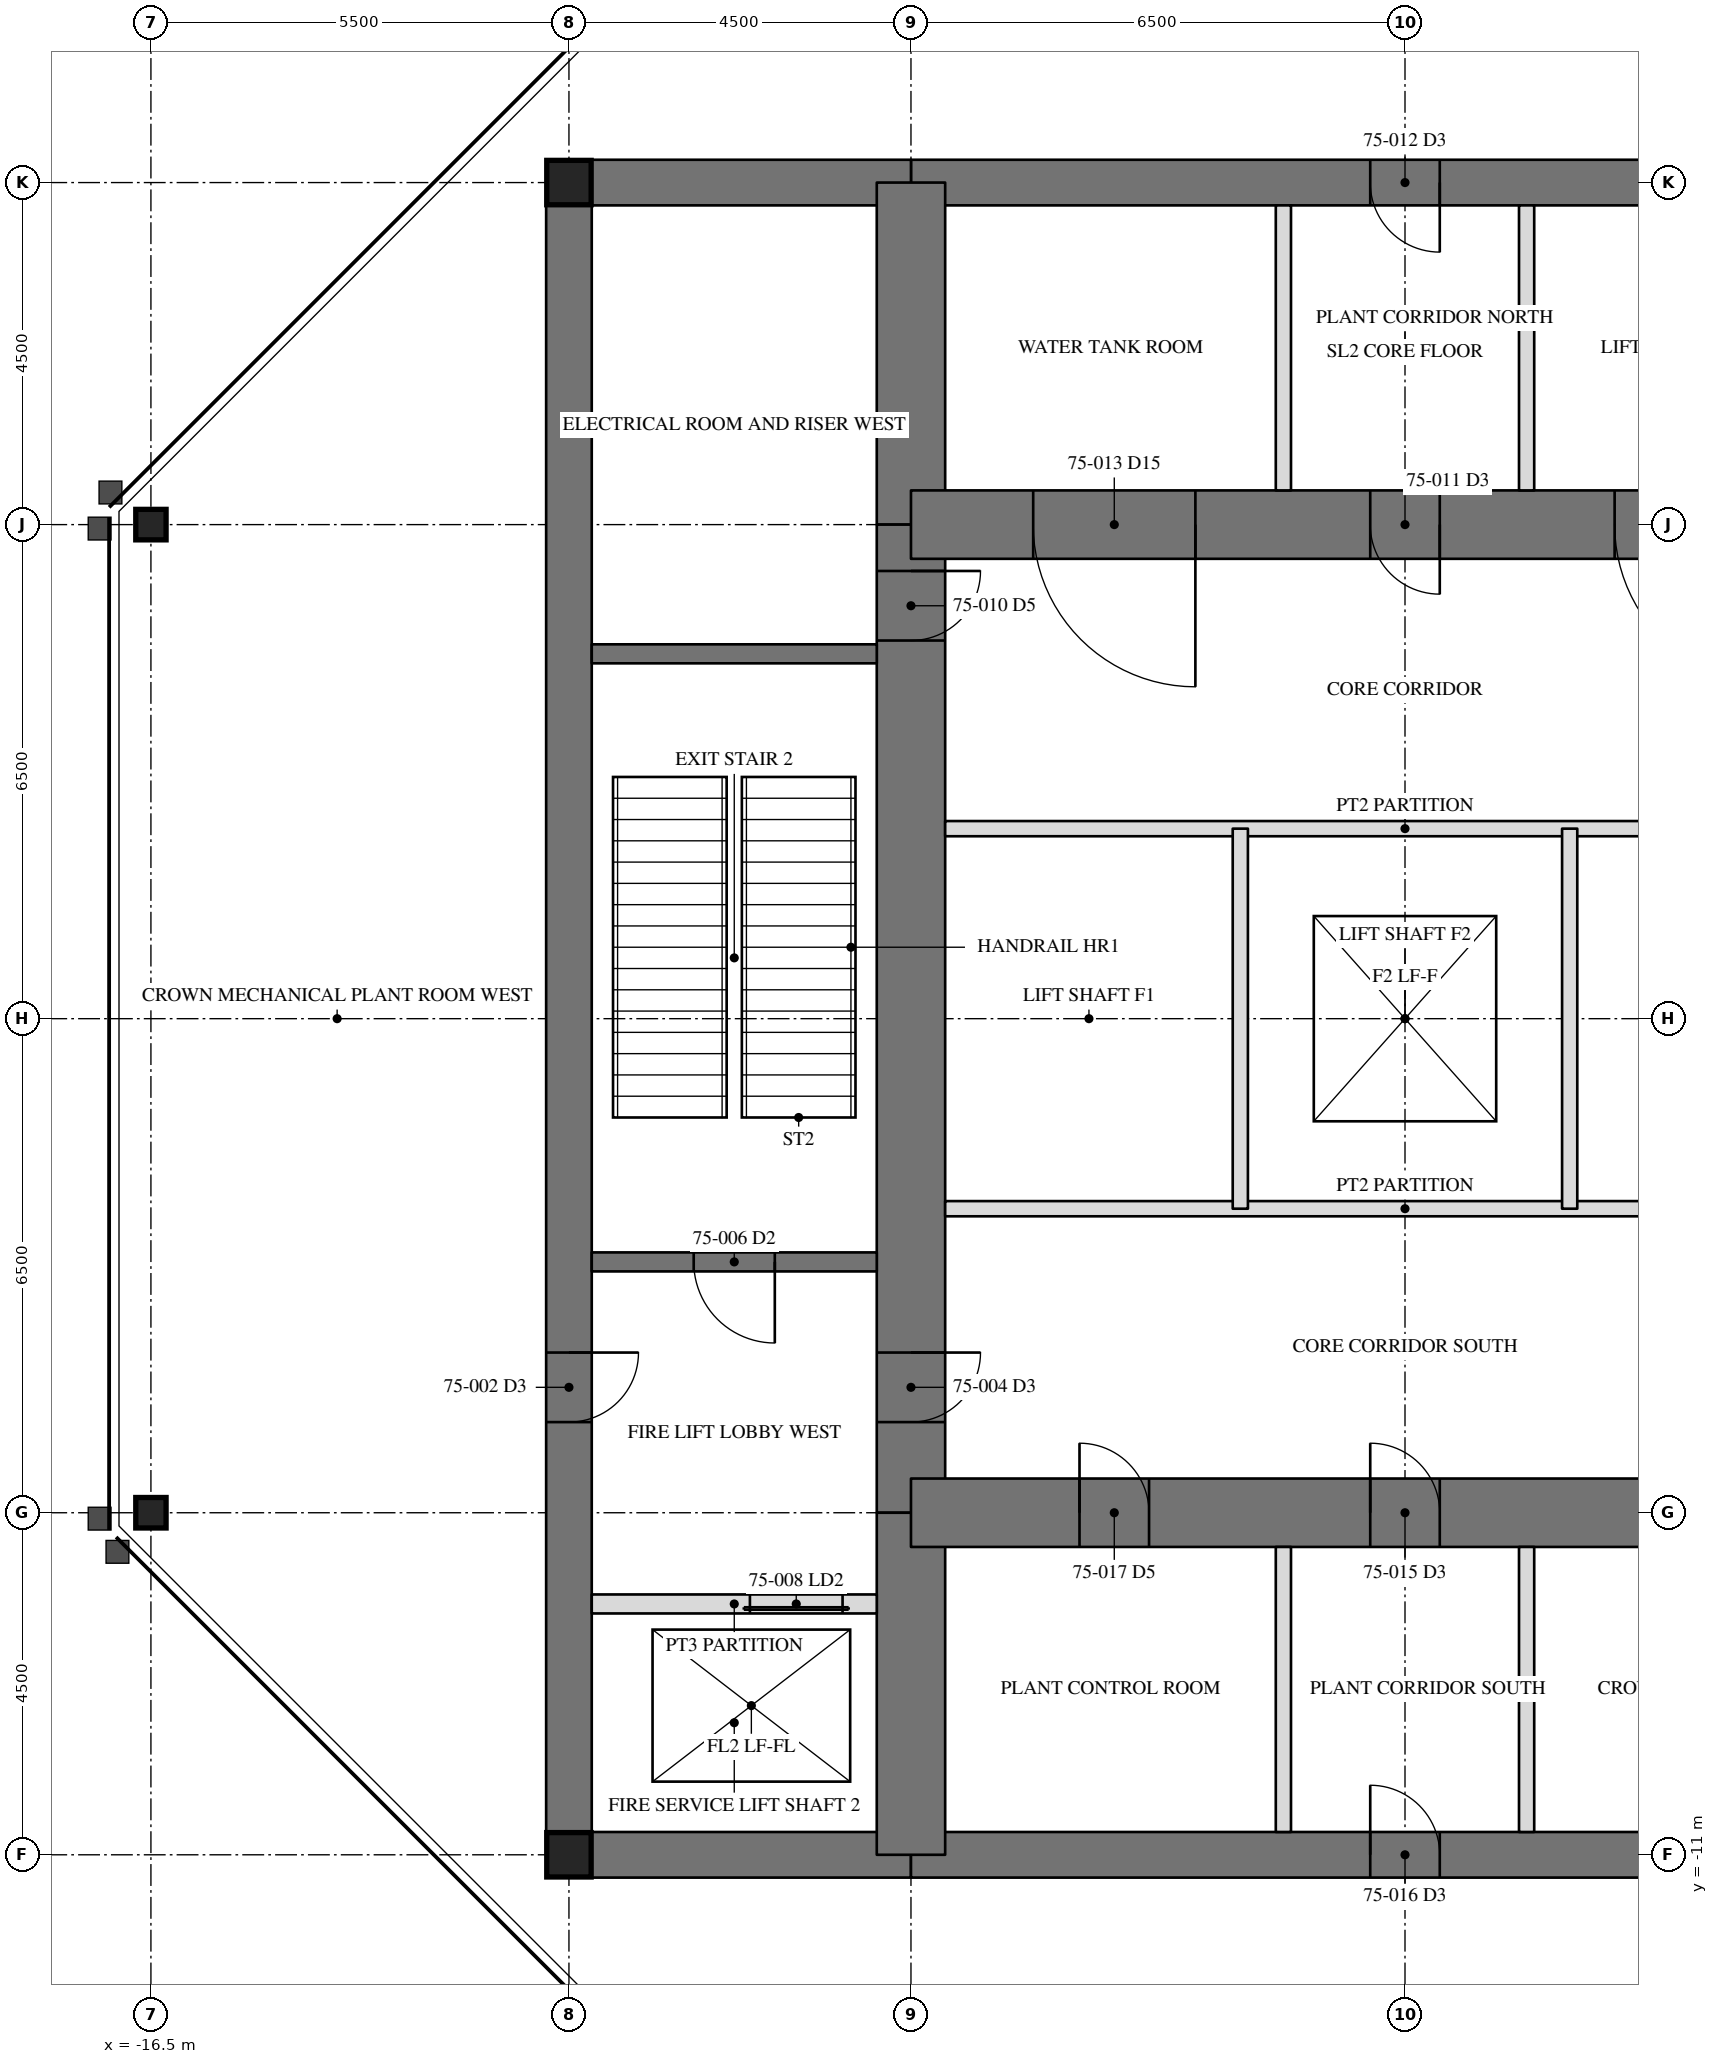
"""IFC4 building model, lengths in metres.
Left out: names, types, materials, properties, quantities, classifications, styles, units other than length and angle.
Written with IfcOpenShell. Run it as: python <this file> out.ifc"""

import sys

from ifc_helpers import new_model, si_unit, direction, frame, frame_2d, origin, origin_2d, place, context, subcontext, project, spatial, rectangle, hollow_rectangle, i_section, extrude, element, fill, save


model = new_model("IFC4")
c1 = context("Model", 3, precision=1e-05, world=origin(), true_north=direction((0.0, 1.0)))
c2 = subcontext(c1, "Body", "Model", "MODEL_VIEW")
j1 = project(units=[si_unit("LENGTHUNIT", "METRE"), si_unit("PLANEANGLEUNIT", "RADIAN")], contexts=[c1])
p1 = place(None, origin())
s1 = spatial("IfcSite", under=j1, at=p1, CompositionType="ELEMENT")
p2 = place(p1, origin())
s2 = spatial("IfcBuilding", under=s1, at=p2, CompositionType="ELEMENT")
p3 = place(p2, frame((0.0, 0.0, 304.2)))
s3 = spatial("IfcBuildingStorey", under=s2, at=p3, CompositionType="ELEMENT", Elevation=304.2)
for number, where, z_axis, x_axis in (
    (1, (-16.5, -6.5, 0.0), (0.0, 0.0, 1.0), (0.0, 1.0, 0.0)),
    (2, (-16.5, 6.5, 0.0), (0.0, 0.0, 1.0), (0.0, 1.0, 0.0)),
):
    element("IfcColumn", number, at=place(p3, frame(where, z_axis=z_axis, x_axis=x_axis)), inside=s3, PredefinedType="COLUMN", context=c2, shape_type="SweptSolid", body=[
        extrude(i_section(OverallWidth=0.401, OverallDepth=0.399, WebThickness=0.025, FlangeThickness=0.04, at=origin_2d()), origin(), (0.0, 0.0, 1.0), 6.0),
    ])
p4 = place(p3, frame((-11.0, 11.0, 0.0), z_axis=(0.0, 0.0, 1.0), x_axis=(0.0, -1.0, 0.0)))
e3 = element("IfcWall", 3, at=p4, inside=s3, PredefinedType="SHEAR", context=c2, shape_type="SweptSolid", body=[
    extrude(rectangle(XDim=22.0, YDim=0.6, at=frame_2d((11.0, 0.0))), origin(), (0.0, 0.0, 1.0), 6.0),
])
p5 = place(p4, frame((15.393, 0.0, 0.0)))
e4 = element("IfcOpeningElement", 4, at=p5, cuts=e3, PredefinedType="OPENING", context=c2, shape_type="SweptSolid", body=[
    extrude(rectangle(XDim=0.915, YDim=2.134, at=frame_2d((0.458, 1.067))), frame((0.0, 0.31, 0.0), z_axis=(0.0, -1.0, 0.0), x_axis=(1.0, 0.0, 0.0)), (0.0, 0.0, 1.0), 0.62),
])
p6 = place(p3, frame((6.5, 11.0, 0.0), z_axis=(0.0, 0.0, 1.0), x_axis=(-1.0, 0.0, 0.0)))
e5 = element("IfcWall", 5, at=p6, inside=s3, PredefinedType="SHEAR", context=c2, shape_type="SweptSolid", body=[
    extrude(rectangle(XDim=13.0, YDim=0.6, at=frame_2d((6.5, 0.0))), origin(), (0.0, 0.0, 1.0), 6.0),
])
p7 = place(p6, frame((6.042, 0.0, 0.0)))
e6 = element("IfcOpeningElement", 6, at=p7, cuts=e5, PredefinedType="OPENING", context=c2, shape_type="SweptSolid", body=[
    extrude(rectangle(XDim=0.915, YDim=2.134, at=frame_2d((0.458, 1.067))), frame((0.0, 0.31, 0.0), z_axis=(0.0, -1.0, 0.0), x_axis=(1.0, 0.0, 0.0)), (0.0, 0.0, 1.0), 0.62),
])
for number, where, z_axis, x_axis in (
    (7, (-6.5, 11.0, 0.0), (0.0, 0.0, 1.0), (-1.0, 0.0, 0.0)),
    (8, (-11.0, -11.0, 0.0), (0.0, 0.0, 1.0), (1.0, 0.0, 0.0)),
):
    element("IfcWall", number, at=place(p3, frame(where, z_axis=z_axis, x_axis=x_axis)), inside=s3, PredefinedType="SHEAR", context=c2, shape_type="SweptSolid", body=[
        extrude(rectangle(XDim=4.5, YDim=0.6, at=frame_2d((2.25, 0.0))), origin(), (0.0, 0.0, 1.0), 6.0),
    ])
p8 = place(p3, frame((-6.5, -11.0, 0.0), z_axis=(0.0, 0.0, 1.0), x_axis=(1.0, 0.0, 0.0)))
e9 = element("IfcWall", 9, at=p8, inside=s3, PredefinedType="SHEAR", context=c2, shape_type="SweptSolid", body=[
    extrude(rectangle(XDim=13.0, YDim=0.6, at=frame_2d((6.5, 0.0))), origin(), (0.0, 0.0, 1.0), 6.0),
])
p9 = place(p8, frame((6.042, 0.0, 0.0)))
e10 = element("IfcOpeningElement", 10, at=p9, cuts=e9, PredefinedType="OPENING", context=c2, shape_type="SweptSolid", body=[
    extrude(rectangle(XDim=0.915, YDim=2.134, at=frame_2d((0.458, 1.067))), frame((0.0, 0.31, 0.0), z_axis=(0.0, -1.0, 0.0), x_axis=(1.0, 0.0, 0.0)), (0.0, 0.0, 1.0), 0.62),
])
p10 = place(p3, frame((-6.5, 11.0, 0.0), z_axis=(0.0, 0.0, 1.0), x_axis=(0.0, -1.0, 0.0)))
e11 = element("IfcWall", 11, at=p10, inside=s3, PredefinedType="SHEAR", context=c2, shape_type="SweptSolid", body=[
    extrude(rectangle(XDim=4.5, YDim=0.9, at=frame_2d((2.25, 0.0))), origin(), (0.0, 0.0, 1.0), 6.0),
])
p11 = place(p3, frame((-6.5, 6.5, 0.0), z_axis=(0.0, 0.0, 1.0), x_axis=(0.0, -1.0, 0.0)))
e12 = element("IfcWall", 12, at=p11, inside=s3, PredefinedType="SHEAR", context=c2, shape_type="SweptSolid", body=[
    extrude(rectangle(XDim=13.0, YDim=0.9, at=frame_2d((6.5, 0.0))), origin(), (0.0, 0.0, 1.0), 6.0),
])
p12 = place(p11, frame((10.893, 0.0, 0.0)))
e13 = element("IfcOpeningElement", 13, at=p12, cuts=e12, PredefinedType="OPENING", context=c2, shape_type="SweptSolid", body=[
    extrude(rectangle(XDim=0.915, YDim=2.134, at=frame_2d((0.458, 1.067))), frame((0.0, 0.46, 0.0), z_axis=(0.0, -1.0, 0.0), x_axis=(1.0, 0.0, 0.0)), (0.0, 0.0, 1.0), 0.92),
])
p13 = place(p11, frame((0.61, 0.0, 0.0)))
e14 = element("IfcOpeningElement", 14, at=p13, cuts=e12, PredefinedType="OPENING", context=c2, shape_type="SweptSolid", body=[
    extrude(rectangle(XDim=0.915, YDim=2.134, at=frame_2d((0.458, 1.067))), frame((0.0, 0.46, 0.0), z_axis=(0.0, -1.0, 0.0), x_axis=(1.0, 0.0, 0.0)), (0.0, 0.0, 1.0), 0.92),
])
p14 = place(p3, frame((-6.5, -6.5, 0.0), z_axis=(0.0, 0.0, 1.0), x_axis=(0.0, -1.0, 0.0)))
e15 = element("IfcWall", 15, at=p14, inside=s3, PredefinedType="SHEAR", context=c2, shape_type="SweptSolid", body=[
    extrude(rectangle(XDim=4.5, YDim=0.9, at=frame_2d((2.25, 0.0))), origin(), (0.0, 0.0, 1.0), 6.0),
])
p15 = place(p3, frame((6.5, 6.5, 0.0), z_axis=(0.0, 0.0, 1.0), x_axis=(-1.0, 0.0, 0.0)))
e16 = element("IfcWall", 16, at=p15, inside=s3, PredefinedType="SHEAR", context=c2, shape_type="SweptSolid", body=[
    extrude(rectangle(XDim=13.0, YDim=0.9, at=frame_2d((6.5, 0.0))), origin(), (0.0, 0.0, 1.0), 6.0),
])
p16 = place(p15, frame((6.042, 0.0, 0.0)))
e17 = element("IfcOpeningElement", 17, at=p16, cuts=e16, PredefinedType="OPENING", context=c2, shape_type="SweptSolid", body=[
    extrude(rectangle(XDim=0.915, YDim=2.134, at=frame_2d((0.458, 1.067))), frame((0.0, 0.46, 0.0), z_axis=(0.0, -1.0, 0.0), x_axis=(1.0, 0.0, 0.0)), (0.0, 0.0, 1.0), 0.92),
])
p17 = place(p15, frame((9.258, 0.0, 0.0)))
e18 = element("IfcOpeningElement", 18, at=p17, cuts=e16, PredefinedType="OPENING", context=c2, shape_type="SweptSolid", body=[
    extrude(rectangle(XDim=2.134, YDim=2.438, at=frame_2d((1.067, 1.219))), frame((0.0, 0.46, 0.0), z_axis=(0.0, -1.0, 0.0), x_axis=(1.0, 0.0, 0.0)), (0.0, 0.0, 1.0), 0.92),
])
p18 = place(p15, frame((1.608, 0.0, 0.0)))
e19 = element("IfcOpeningElement", 19, at=p18, cuts=e16, PredefinedType="OPENING", context=c2, shape_type="SweptSolid", body=[
    extrude(rectangle(XDim=2.134, YDim=2.438, at=frame_2d((1.067, 1.219))), frame((0.0, 0.46, 0.0), z_axis=(0.0, -1.0, 0.0), x_axis=(1.0, 0.0, 0.0)), (0.0, 0.0, 1.0), 0.92),
])
p19 = place(p3, frame((-6.5, -6.5, 0.0), z_axis=(0.0, 0.0, 1.0), x_axis=(1.0, 0.0, 0.0)))
e20 = element("IfcWall", 20, at=p19, inside=s3, PredefinedType="SHEAR", context=c2, shape_type="SweptSolid", body=[
    extrude(rectangle(XDim=13.0, YDim=0.9, at=frame_2d((6.5, 0.0))), origin(), (0.0, 0.0, 1.0), 6.0),
])
p20 = place(p19, frame((6.042, 0.0, 0.0)))
e21 = element("IfcOpeningElement", 21, at=p20, cuts=e20, PredefinedType="OPENING", context=c2, shape_type="SweptSolid", body=[
    extrude(rectangle(XDim=0.915, YDim=2.134, at=frame_2d((0.458, 1.067))), frame((0.0, 0.46, 0.0), z_axis=(0.0, -1.0, 0.0), x_axis=(1.0, 0.0, 0.0)), (0.0, 0.0, 1.0), 0.92),
])
p21 = place(p19, frame((2.218, 0.0, 0.0)))
e22 = element("IfcOpeningElement", 22, at=p21, cuts=e20, PredefinedType="OPENING", context=c2, shape_type="SweptSolid", body=[
    extrude(rectangle(XDim=0.915, YDim=2.134, at=frame_2d((0.458, 1.067))), frame((0.0, 0.46, 0.0), z_axis=(0.0, -1.0, 0.0), x_axis=(1.0, 0.0, 0.0)), (0.0, 0.0, 1.0), 0.92),
])
p22 = place(p19, frame((9.867, 0.0, 0.0)))
e23 = element("IfcOpeningElement", 23, at=p22, cuts=e20, PredefinedType="OPENING", context=c2, shape_type="SweptSolid", body=[
    extrude(rectangle(XDim=0.915, YDim=2.134, at=frame_2d((0.458, 1.067))), frame((0.0, 0.46, 0.0), z_axis=(0.0, -1.0, 0.0), x_axis=(1.0, 0.0, 0.0)), (0.0, 0.0, 1.0), 0.92),
])
for number, where, z_axis, x_axis in (
    (24, (-11.0, 11.0, 0.0), (0.0, 0.0, 1.0), (1.0, 0.0, 0.0)),
    (25, (-11.0, -11.0, 0.0), (0.0, 0.0, 1.0), (1.0, 0.0, 0.0)),
):
    element("IfcColumn", number, at=place(p3, frame(where, z_axis=z_axis, x_axis=x_axis)), inside=s3, PredefinedType="COLUMN", context=c2, shape_type="SweptSolid", body=[
        extrude(hollow_rectangle(XDim=0.584, YDim=0.584, WallThickness=0.051, at=origin_2d()), origin(), (0.0, 0.0, 1.0), 6.0),
    ])
p23 = place(p3, frame((-6.95, 4.8, 0.0), z_axis=(0.0, 0.0, 1.0), x_axis=(-1.0, 0.0, 0.0)))
e26 = element("IfcWall", 26, at=p23, inside=s3, PredefinedType="SOLIDWALL", context=c2, shape_type="SweptSolid", body=[
    extrude(rectangle(XDim=3.75, YDim=0.25, at=frame_2d((1.875, 0.0))), origin(), (0.0, 0.0, 1.0), 5.81),
])
p24 = place(p3, frame((-6.95, -3.2, 0.0), z_axis=(0.0, 0.0, 1.0), x_axis=(-1.0, 0.0, 0.0)))
e27 = element("IfcWall", 27, at=p24, inside=s3, PredefinedType="SOLIDWALL", context=c2, shape_type="SweptSolid", body=[
    extrude(rectangle(XDim=3.75, YDim=0.25, at=frame_2d((1.875, 0.0))), origin(), (0.0, 0.0, 1.0), 5.81),
])
p25 = place(p24, frame((1.342, 0.0, 0.0)))
e28 = element("IfcOpeningElement", 28, at=p25, cuts=e27, PredefinedType="OPENING", context=c2, shape_type="SweptSolid", body=[
    extrude(rectangle(XDim=1.067, YDim=2.134, at=frame_2d((0.533, 1.067))), frame((0.0, 0.135, 0.0), z_axis=(0.0, -1.0, 0.0), x_axis=(1.0, 0.0, 0.0)), (0.0, 0.0, 1.0), 0.27),
])
p26 = place(p3, frame((-6.95, -7.7, 0.0), z_axis=(0.0, 0.0, 1.0), x_axis=(-1.0, 0.0, 0.0)))
e29 = element("IfcWall", 29, at=p26, inside=s3, PredefinedType="PARTITIONING", context=c2, shape_type="SweptSolid", body=[
    extrude(rectangle(XDim=3.75, YDim=0.25, at=frame_2d((1.875, 0.0))), origin(), (0.0, 0.0, 1.0), 5.81),
])
p27 = place(p26, frame((0.45, 0.0, 0.0)))
e30 = element("IfcOpeningElement", 30, at=p27, cuts=e29, PredefinedType="OPENING", context=c2, shape_type="SweptSolid", body=[
    extrude(rectangle(XDim=1.219, YDim=2.134, at=frame_2d((0.609, 1.067))), frame((0.0, 0.135, 0.0), z_axis=(0.0, -1.0, 0.0), x_axis=(1.0, 0.0, 0.0)), (0.0, 0.0, 1.0), 0.27),
])
for number, where, z_axis, x_axis in (
    (31, (-6.05, 2.5, 0.0), (0.0, 0.0, 1.0), (1.0, 0.0, 0.0)),
    (32, (6.05, -2.5, 0.0), (0.0, 0.0, 1.0), (-1.0, 0.0, 0.0)),
):
    element("IfcWall", number, at=place(p3, frame(where, z_axis=z_axis, x_axis=x_axis)), inside=s3, PredefinedType="PARTITIONING", context=c2, shape_type="SweptSolid", body=[
        extrude(rectangle(XDim=12.1, YDim=0.2, at=frame_2d((6.05, 0.0))), origin(), (0.0, 0.0, 1.0), 5.81),
    ])
for number, where, z_axis, x_axis in (
    (33, (-2.167, -2.5, 0.0), (0.0, 0.0, 1.0), (0.0, 1.0, 0.0)),
    (34, (2.167, -2.5, 0.0), (0.0, 0.0, 1.0), (0.0, 1.0, 0.0)),
):
    element("IfcWall", number, at=place(p3, frame(where, z_axis=z_axis, x_axis=x_axis)), inside=s3, PredefinedType="PARTITIONING", context=c2, shape_type="SweptSolid", body=[
        extrude(rectangle(XDim=5.0, YDim=0.2, at=frame_2d((2.5, 0.0))), origin(), (0.0, 0.0, 1.0), 5.81),
    ])
for number, where, z_axis, x_axis in (
    (35, (-1.6, 6.95, 0.0), (0.0, 0.0, 1.0), (0.0, 1.0, 0.0)),
    (36, (1.6, 6.95, 0.0), (0.0, 0.0, 1.0), (0.0, 1.0, 0.0)),
    (37, (-1.6, -6.95, 0.0), (0.0, 0.0, 1.0), (0.0, -1.0, 0.0)),
    (38, (1.6, -6.95, 0.0), (0.0, 0.0, 1.0), (0.0, -1.0, 0.0)),
):
    element("IfcWall", number, at=place(p3, frame(where, z_axis=z_axis, x_axis=x_axis)), inside=s3, PredefinedType="PARTITIONING", context=c2, shape_type="SweptSolid", body=[
        extrude(rectangle(XDim=3.75, YDim=0.2, at=frame_2d((1.875, 0.0))), origin(), (0.0, 0.0, 1.0), 5.81),
    ])
p28 = place(p5, origin())
e39 = element("IfcDoor", 39, at=p28, inside=s3, OperationType="SINGLE_SWING_RIGHT", PredefinedType="DOOR", context=c2, shape_type="SweptSolid", body=[
    extrude(rectangle(XDim=0.915, YDim=2.134, at=frame_2d((0.458, 1.067))), frame((0.0, -0.225, 0.0), z_axis=(0.0, -1.0, 0.0), x_axis=(1.0, 0.0, 0.0)), (0.0, 0.0, 1.0), 0.05),
])
fill(e4, e39)
p29 = place(p12, origin())
e40 = element("IfcDoor", 40, at=p29, inside=s3, OperationType="SINGLE_SWING_RIGHT", PredefinedType="DOOR", context=c2, shape_type="SweptSolid", body=[
    extrude(rectangle(XDim=0.915, YDim=2.134, at=frame_2d((0.458, 1.067))), frame((0.0, -0.375, 0.0), z_axis=(0.0, -1.0, 0.0), x_axis=(1.0, 0.0, 0.0)), (0.0, 0.0, 1.0), 0.05),
])
fill(e13, e40)
p30 = place(p25, origin())
e41 = element("IfcDoor", 41, at=p30, inside=s3, OperationType="SINGLE_SWING_LEFT", PredefinedType="DOOR", context=c2, shape_type="SweptSolid", body=[
    extrude(rectangle(XDim=1.067, YDim=2.134, at=frame_2d((0.533, 1.067))), frame((0.0, 0.025, 0.0), z_axis=(0.0, -1.0, 0.0), x_axis=(1.0, 0.0, 0.0)), (0.0, 0.0, 1.0), 0.05),
])
fill(e28, e41)
p31 = place(p27, origin())
e42 = element("IfcDoor", 42, at=p31, inside=s3, OperationType="SLIDING_TO_LEFT", PredefinedType="DOOR", context=c2, shape_type="SweptSolid", body=[
    extrude(rectangle(XDim=1.219, YDim=2.134, at=frame_2d((0.609, 1.067))), frame((0.0, 0.025, 0.0), z_axis=(0.0, -1.0, 0.0), x_axis=(1.0, 0.0, 0.0)), (0.0, 0.0, 1.0), 0.05),
])
fill(e30, e42)
p32 = place(p13, origin())
e43 = element("IfcDoor", 43, at=p32, inside=s3, OperationType="SINGLE_SWING_RIGHT", PredefinedType="DOOR", context=c2, shape_type="SweptSolid", body=[
    extrude(rectangle(XDim=0.915, YDim=2.134, at=frame_2d((0.458, 1.067))), frame((0.0, -0.375, 0.0), z_axis=(0.0, -1.0, 0.0), x_axis=(1.0, 0.0, 0.0)), (0.0, 0.0, 1.0), 0.05),
])
fill(e14, e43)
p33 = place(p16, origin())
e44 = element("IfcDoor", 44, at=p33, inside=s3, OperationType="SINGLE_SWING_RIGHT", PredefinedType="DOOR", context=c2, shape_type="SweptSolid", body=[
    extrude(rectangle(XDim=0.915, YDim=2.134, at=frame_2d((0.458, 1.067))), frame((0.0, -0.375, 0.0), z_axis=(0.0, -1.0, 0.0), x_axis=(1.0, 0.0, 0.0)), (0.0, 0.0, 1.0), 0.05),
])
fill(e17, e44)
p34 = place(p7, origin())
e45 = element("IfcDoor", 45, at=p34, inside=s3, OperationType="SINGLE_SWING_RIGHT", PredefinedType="DOOR", context=c2, shape_type="SweptSolid", body=[
    extrude(rectangle(XDim=0.915, YDim=2.134, at=frame_2d((0.458, 1.067))), frame((0.0, -0.225, 0.0), z_axis=(0.0, -1.0, 0.0), x_axis=(1.0, 0.0, 0.0)), (0.0, 0.0, 1.0), 0.05),
])
fill(e6, e45)
p35 = place(p17, origin())
e46 = element("IfcDoor", 46, at=p35, inside=s3, OperationType="DOUBLE_DOOR_SINGLE_SWING", PredefinedType="DOOR", context=c2, shape_type="SweptSolid", body=[
    extrude(rectangle(XDim=2.134, YDim=2.438, at=frame_2d((1.067, 1.219))), frame((0.0, -0.375, 0.0), z_axis=(0.0, -1.0, 0.0), x_axis=(1.0, 0.0, 0.0)), (0.0, 0.0, 1.0), 0.05),
])
fill(e18, e46)
p36 = place(p18, origin())
e47 = element("IfcDoor", 47, at=p36, inside=s3, OperationType="DOUBLE_DOOR_SINGLE_SWING", PredefinedType="DOOR", context=c2, shape_type="SweptSolid", body=[
    extrude(rectangle(XDim=2.134, YDim=2.438, at=frame_2d((1.067, 1.219))), frame((0.0, -0.375, 0.0), z_axis=(0.0, -1.0, 0.0), x_axis=(1.0, 0.0, 0.0)), (0.0, 0.0, 1.0), 0.05),
])
fill(e19, e47)
p37 = place(p20, origin())
e48 = element("IfcDoor", 48, at=p37, inside=s3, OperationType="SINGLE_SWING_RIGHT", PredefinedType="DOOR", context=c2, shape_type="SweptSolid", body=[
    extrude(rectangle(XDim=0.915, YDim=2.134, at=frame_2d((0.458, 1.067))), frame((0.0, -0.375, 0.0), z_axis=(0.0, -1.0, 0.0), x_axis=(1.0, 0.0, 0.0)), (0.0, 0.0, 1.0), 0.05),
])
fill(e21, e48)
p38 = place(p9, origin())
e49 = element("IfcDoor", 49, at=p38, inside=s3, OperationType="SINGLE_SWING_RIGHT", PredefinedType="DOOR", context=c2, shape_type="SweptSolid", body=[
    extrude(rectangle(XDim=0.915, YDim=2.134, at=frame_2d((0.458, 1.067))), frame((0.0, -0.225, 0.0), z_axis=(0.0, -1.0, 0.0), x_axis=(1.0, 0.0, 0.0)), (0.0, 0.0, 1.0), 0.05),
])
fill(e10, e49)
p39 = place(p21, origin())
e50 = element("IfcDoor", 50, at=p39, inside=s3, OperationType="SINGLE_SWING_RIGHT", PredefinedType="DOOR", context=c2, shape_type="SweptSolid", body=[
    extrude(rectangle(XDim=0.915, YDim=2.134, at=frame_2d((0.458, 1.067))), frame((0.0, -0.375, 0.0), z_axis=(0.0, -1.0, 0.0), x_axis=(1.0, 0.0, 0.0)), (0.0, 0.0, 1.0), 0.05),
])
fill(e22, e50)
save(model, sys.argv[1])
